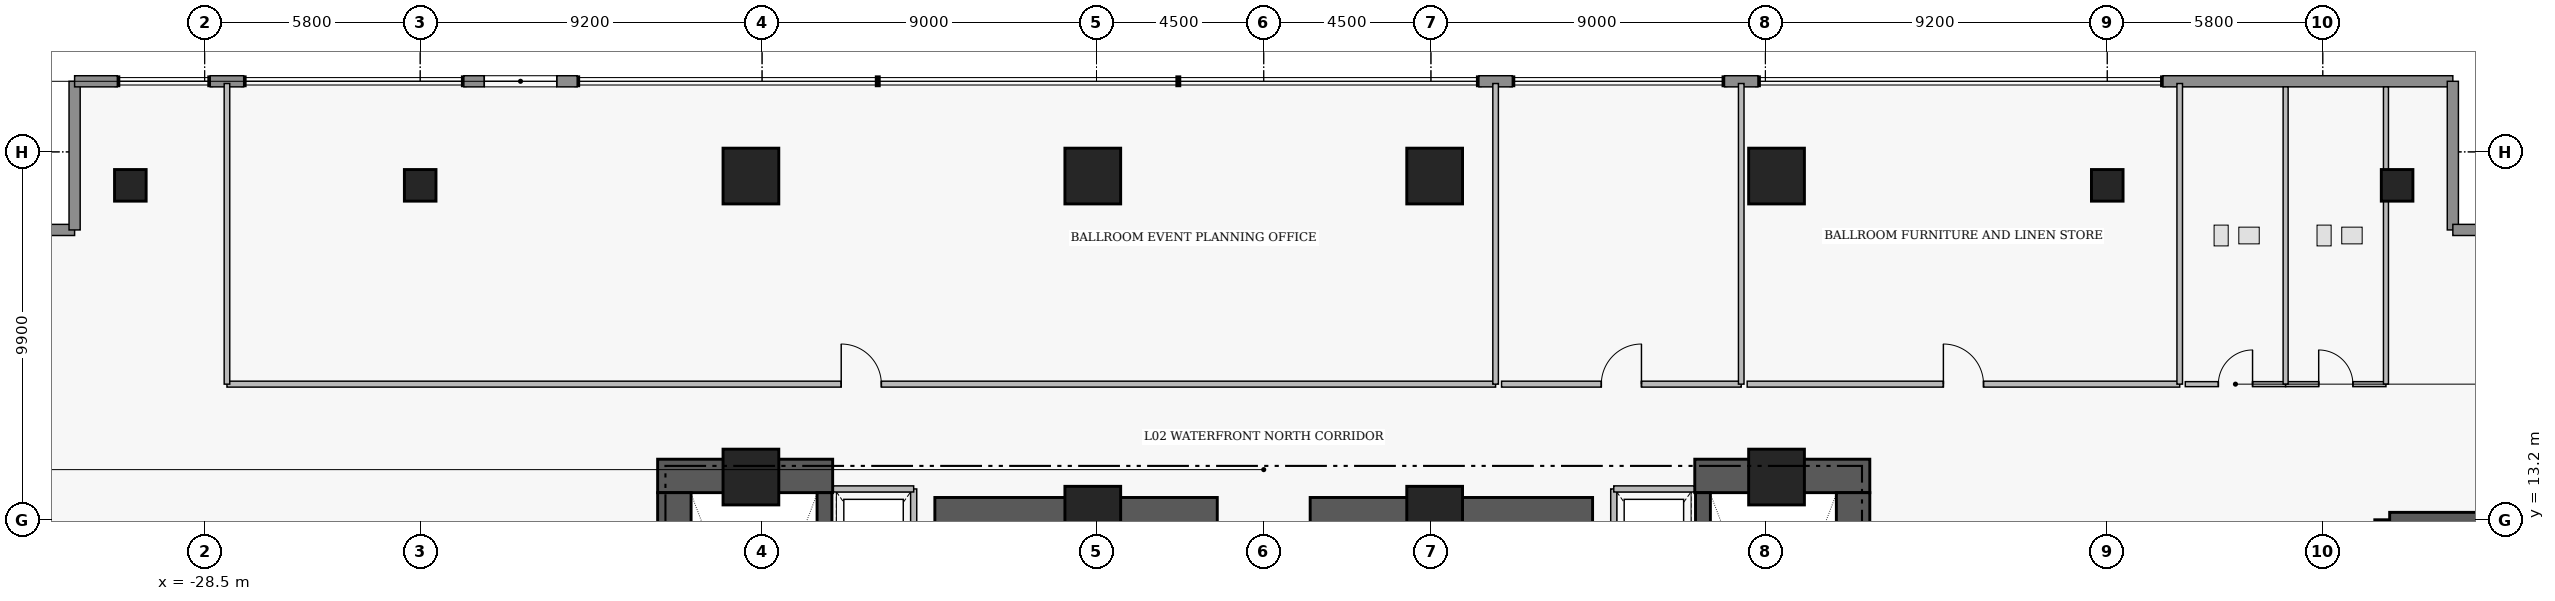
"""IFC4 building model, lengths in metres.
Left out: names, types, materials, properties, quantities, classifications, styles, units other than length and angle.
Written with IfcOpenShell. Run it as: python <this file> out.ifc"""

import sys

from ifc_helpers import new_model, si_unit, direction, frame, frame_2d, origin, origin_2d, place, context, subcontext, project, spatial, rectangle, extrude, element, fill, save


model = new_model("IFC4")
c1 = context("Model", 3, precision=1e-05, world=origin(), true_north=direction((0.0, 1.0)))
c2 = subcontext(c1, "Body", "Model", "MODEL_VIEW")
j1 = project(units=[si_unit("LENGTHUNIT", "METRE"), si_unit("PLANEANGLEUNIT", "RADIAN")], contexts=[c1])
p1 = place(None, origin())
s1 = spatial("IfcSite", under=j1, at=p1, CompositionType="ELEMENT")
p2 = place(p1, origin())
s2 = spatial("IfcBuilding", under=s1, at=p2, CompositionType="ELEMENT")
p3 = place(p2, frame((0.0, 0.0, 11.4)))
s3 = spatial("IfcBuildingStorey", under=s2, at=p3, CompositionType="ELEMENT", Elevation=11.4)
for number, where, z_axis, x_axis in (
    (1, (-16.31, 14.38, 0.0), (0.0, 0.0, 1.0), (1.0, 0.0, 0.0)),
    (2, (11.6, 14.38, 0.0), (0.0, 0.0, 1.0), (1.0, 0.0, 0.0)),
):
    element("IfcWall", number, at=place(p3, frame(where, z_axis=z_axis, x_axis=x_axis)), inside=s3, PredefinedType="SHEAR", context=c2, shape_type="SweptSolid", body=[
        extrude(rectangle(XDim=4.71, YDim=0.9, at=frame_2d((2.355, 0.0))), origin(), (0.0, 0.0, 1.0), 6.41),
    ])
for number, where, z_axis, x_axis in (
    (3, (-15.86, 4.97, 0.0), (0.0, 0.0, 1.0), (0.0, 1.0, 0.0)),
    (4, (15.86, 4.97, 0.0), (0.0, 0.0, 1.0), (0.0, 1.0, 0.0)),
):
    element("IfcWall", number, at=place(p3, frame(where, z_axis=z_axis, x_axis=x_axis)), inside=s3, PredefinedType="SHEAR", context=c2, shape_type="SweptSolid", body=[
        extrude(rectangle(XDim=8.96, YDim=0.9, at=frame_2d((4.48, 0.0))), origin(), (0.0, 0.0, 1.0), 6.41),
    ])
for number, where, z_axis, x_axis in (
    (5, (-8.85, 13.35, 0.0), (0.0, 0.0, 1.0), (1.0, 0.0, 0.0)),
    (6, (1.25, 13.35, 0.0), (0.0, 0.0, 1.0), (1.0, 0.0, 0.0)),
):
    element("IfcWall", number, at=place(p3, frame(where, z_axis=z_axis, x_axis=x_axis)), inside=s3, PredefinedType="SHEAR", context=c2, shape_type="SweptSolid", body=[
        extrude(rectangle(XDim=7.6, YDim=0.9, at=frame_2d((3.8, 0.0))), origin(), (0.0, 0.0, 1.0), 6.34),
    ])
p4 = place(p3, frame((-11.82, 4.97, 0.0), z_axis=(0.0, 0.0, 1.0), x_axis=(0.0, 1.0, 0.0)))
e7 = element("IfcWall", 7, at=p4, inside=s3, PredefinedType="SHEAR", context=c2, shape_type="SweptSolid", body=[
    extrude(rectangle(XDim=8.96, YDim=0.4, at=frame_2d((4.48, 0.0))), origin(), (0.0, 0.0, 1.0), 6.41),
])
p5 = place(p4, frame((0.31, 0.0, 0.0)))
e8 = element("IfcOpeningElement", 8, at=p5, cuts=e7, PredefinedType="OPENING", context=c2, shape_type="SweptSolid", body=[
    extrude(rectangle(XDim=1.12, YDim=2.22, at=frame_2d((0.56, 1.11))), frame((0.0, 0.21, 0.0), z_axis=(0.0, -1.0, 0.0), x_axis=(1.0, 0.0, 0.0)), (0.0, 0.0, 1.0), 0.42),
])
p6 = place(p3, frame((11.82, 13.93, 0.0), z_axis=(0.0, 0.0, 1.0), x_axis=(0.0, -1.0, 0.0)))
e9 = element("IfcWall", 9, at=p6, inside=s3, PredefinedType="SHEAR", context=c2, shape_type="SweptSolid", body=[
    extrude(rectangle(XDim=8.96, YDim=0.4, at=frame_2d((4.48, 0.0))), origin(), (0.0, 0.0, 1.0), 6.41),
])
p7 = place(p6, frame((7.53, 0.0, 0.0)))
e10 = element("IfcOpeningElement", 10, at=p7, cuts=e9, PredefinedType="OPENING", context=c2, shape_type="SweptSolid", body=[
    extrude(rectangle(XDim=1.12, YDim=2.22, at=frame_2d((0.56, 1.11))), frame((0.0, 0.21, 0.0), z_axis=(0.0, -1.0, 0.0), x_axis=(1.0, 0.0, 0.0)), (0.0, 0.0, 1.0), 0.42),
])
p8 = place(p3, frame((30.1, 13.2, 0.0), z_axis=(0.0, 0.0, 1.0), x_axis=(0.0, -1.0, 0.0)))
e11 = element("IfcWall", 11, at=p8, inside=s3, PredefinedType="SHEAR", context=c2, shape_type="SweptSolid", body=[
    extrude(rectangle(XDim=11.8, YDim=0.4, at=frame_2d((5.9, 0.0))), origin(), (0.0, 0.0, 1.0), 6.41),
])
p9 = place(p8, frame((9.7, 0.0, 0.0)))
e12 = element("IfcOpeningElement", 12, at=p9, cuts=e11, PredefinedType="OPENING", context=c2, shape_type="SweptSolid", body=[
    extrude(rectangle(XDim=1.12, YDim=2.22, at=frame_2d((0.56, 1.11))), frame((0.0, 0.21, 0.0), z_axis=(0.0, -1.0, 0.0), x_axis=(1.0, 0.0, 0.0)), (0.0, 0.0, 1.0), 0.42),
])
p10 = place(p3, frame((30.3, 13.2, 0.0), z_axis=(0.0, 0.0, 1.0), x_axis=(1.0, 0.0, 0.0)))
e13 = element("IfcWall", 13, at=p10, inside=s3, PredefinedType="SHEAR", context=c2, shape_type="SweptSolid", body=[
    extrude(rectangle(XDim=5.35, YDim=0.4, at=frame_2d((2.675, 0.0))), origin(), (0.0, 0.0, 1.0), 6.41),
])
for number, where, z_axis, x_axis in (
    (14, (-13.8, 14.35, 0.0), (0.0, 0.0, 1.0), (1.0, 0.0, 0.0)),
    (15, (-4.6, 13.35, 0.0), (0.0, 0.0, 1.0), (1.0, 0.0, 0.0)),
    (16, (4.6, 13.35, 0.0), (0.0, 0.0, 1.0), (1.0, 0.0, 0.0)),
    (17, (13.8, 14.35, 0.0), (0.0, 0.0, 1.0), (1.0, 0.0, 0.0)),
    (18, (-13.8, 22.45, 0.0), (0.0, 0.0, 1.0), (1.0, 0.0, 0.0)),
    (19, (-4.6, 22.45, 0.0), (0.0, 0.0, 1.0), (1.0, 0.0, 0.0)),
    (20, (4.6, 22.45, 0.0), (0.0, 0.0, 1.0), (1.0, 0.0, 0.0)),
    (21, (13.8, 22.45, 0.0), (0.0, 0.0, 1.0), (1.0, 0.0, 0.0)),
):
    element("IfcColumn", number, at=place(p3, frame(where, z_axis=z_axis, x_axis=x_axis)), inside=s3, PredefinedType="COLUMN", context=c2, shape_type="SweptSolid", body=[
        extrude(rectangle(XDim=1.5, YDim=1.5, at=origin_2d()), origin(), (0.0, 0.0, 1.0), 6.6),
    ])
for number, where, z_axis, x_axis in (
    (22, (-30.5, 22.2, 0.0), (0.0, 0.0, 1.0), (1.0, 0.0, 0.0)),
    (23, (30.5, 22.2, 0.0), (0.0, 0.0, 1.0), (1.0, 0.0, 0.0)),
    (24, (-22.7, 22.2, 0.0), (0.0, 0.0, 1.0), (1.0, 0.0, 0.0)),
    (25, (22.7, 22.2, 0.0), (0.0, 0.0, 1.0), (1.0, 0.0, 0.0)),
):
    element("IfcColumn", number, at=place(p3, frame(where, z_axis=z_axis, x_axis=x_axis)), inside=s3, PredefinedType="COLUMN", context=c2, shape_type="SweptSolid", body=[
        extrude(rectangle(XDim=0.85, YDim=0.85, at=origin_2d()), origin(), (0.0, 0.0, 1.0), 6.6),
    ])
for number, where, z_axis, x_axis in (
    (26, (-36.0, 21.0, 0.0), (0.0, 0.0, 1.0), (1.0, 0.0, 0.0)),
    (27, (-32.0, 21.0, 0.0), (0.0, 0.0, 1.0), (0.0, 1.0, 0.0)),
):
    element("IfcWall", number, at=place(p3, frame(where, z_axis=z_axis, x_axis=x_axis)), inside=s3, PredefinedType="STANDARD", context=c2, shape_type="SweptSolid", body=[
        extrude(rectangle(XDim=4.0, YDim=0.3, at=frame_2d((2.0, 0.0))), origin(), (0.0, 0.0, 1.0), 6.34),
    ])
p11 = place(p3, frame((-32.0, 25.0, 0.0), z_axis=(0.0, 0.0, 1.0), x_axis=(1.0, 0.0, 0.0)))
e28 = element("IfcWall", 28, at=p11, inside=s3, PredefinedType="STANDARD", context=c2, shape_type="SweptSolid", body=[
    extrude(rectangle(XDim=1.15, YDim=0.3, at=frame_2d((0.575, 0.0))), origin(), (0.0, 0.0, 1.0), 6.34),
])
p12 = place(p3, frame((-28.35, 25.0, 0.0), z_axis=(0.0, 0.0, 1.0), x_axis=(1.0, 0.0, 0.0)))
e29 = element("IfcWall", 29, at=p12, inside=s3, PredefinedType="STANDARD", context=c2, shape_type="SweptSolid", body=[
    extrude(rectangle(XDim=0.9, YDim=0.3, at=frame_2d((0.45, 0.0))), origin(), (0.0, 0.0, 1.0), 6.34),
])
p13 = place(p3, frame((-21.525, 25.0, 0.0), z_axis=(0.0, 0.0, 1.0), x_axis=(1.0, 0.0, 0.0)))
e30 = element("IfcWall", 30, at=p13, inside=s3, PredefinedType="STANDARD", context=c2, shape_type="SweptSolid", body=[
    extrude(rectangle(XDim=3.05, YDim=0.3, at=frame_2d((1.525, 0.0))), origin(), (0.0, 0.0, 1.0), 6.34),
])
p14 = place(p13, frame((0.55, 0.0, 0.9)))
e31 = element("IfcOpeningElement", 31, at=p14, cuts=e30, PredefinedType="OPENING", context=c2, shape_type="SweptSolid", body=[
    extrude(rectangle(XDim=1.95, YDim=2.05, at=frame_2d((0.975, 1.025))), frame((0.0, 0.16, 0.0), z_axis=(0.0, -1.0, 0.0), x_axis=(1.0, 0.0, 0.0)), (0.0, 0.0, 1.0), 0.32),
])
p15 = place(p3, frame((5.79, 25.0, 0.0), z_axis=(0.0, 0.0, 1.0), x_axis=(1.0, 0.0, 0.0)))
e32 = element("IfcWall", 32, at=p15, inside=s3, PredefinedType="STANDARD", context=c2, shape_type="SweptSolid", body=[
    extrude(rectangle(XDim=0.9, YDim=0.3, at=frame_2d((0.45, 0.0))), origin(), (0.0, 0.0, 1.0), 6.34),
])
p16 = place(p3, frame((12.4, 25.0, 0.0), z_axis=(0.0, 0.0, 1.0), x_axis=(1.0, 0.0, 0.0)))
e33 = element("IfcWall", 33, at=p16, inside=s3, PredefinedType="STANDARD", context=c2, shape_type="SweptSolid", body=[
    extrude(rectangle(XDim=0.9, YDim=0.3, at=frame_2d((0.45, 0.0))), origin(), (0.0, 0.0, 1.0), 6.34),
])
p17 = place(p3, frame((24.2, 25.0, 0.0), z_axis=(0.0, 0.0, 1.0), x_axis=(1.0, 0.0, 0.0)))
e34 = element("IfcWall", 34, at=p17, inside=s3, PredefinedType="STANDARD", context=c2, shape_type="SweptSolid", body=[
    extrude(rectangle(XDim=7.8, YDim=0.3, at=frame_2d((3.9, 0.0))), origin(), (0.0, 0.0, 1.0), 6.34),
])
for number, where, z_axis, x_axis in (
    (35, (32.0, 25.0, 0.0), (0.0, 0.0, 1.0), (0.0, -1.0, 0.0)),
    (36, (32.0, 21.0, 0.0), (0.0, 0.0, 1.0), (1.0, 0.0, 0.0)),
):
    element("IfcWall", number, at=place(p3, frame(where, z_axis=z_axis, x_axis=x_axis)), inside=s3, PredefinedType="STANDARD", context=c2, shape_type="SweptSolid", body=[
        extrude(rectangle(XDim=4.0, YDim=0.3, at=frame_2d((2.0, 0.0))), origin(), (0.0, 0.0, 1.0), 6.34),
    ])
p18 = place(p3, frame((-27.9, 16.85, 0.0), z_axis=(0.0, 0.0, 1.0), x_axis=(1.0, 0.0, 0.0)))
e37 = element("IfcWall", 37, at=p18, inside=s3, PredefinedType="PARTITIONING", context=c2, shape_type="SweptSolid", body=[
    extrude(rectangle(XDim=34.14, YDim=0.16, at=frame_2d((17.07, 0.0))), origin(), (0.0, 0.0, 1.0), 5.807),
])
p19 = place(p18, frame((16.53, 0.0, 0.0)))
e38 = element("IfcOpeningElement", 38, at=p19, cuts=e37, PredefinedType="OPENING", context=c2, shape_type="SweptSolid", body=[
    extrude(rectangle(XDim=1.08, YDim=2.18, at=frame_2d((0.54, 1.09))), frame((0.0, 0.09, 0.0), z_axis=(0.0, -1.0, 0.0), x_axis=(1.0, 0.0, 0.0)), (0.0, 0.0, 1.0), 0.18),
])
p20 = place(p3, frame((6.4, 16.85, 0.0), z_axis=(0.0, 0.0, 1.0), x_axis=(1.0, 0.0, 0.0)))
e39 = element("IfcWall", 39, at=p20, inside=s3, PredefinedType="PARTITIONING", context=c2, shape_type="SweptSolid", body=[
    extrude(rectangle(XDim=6.45, YDim=0.16, at=frame_2d((3.225, 0.0))), origin(), (0.0, 0.0, 1.0), 5.807),
])
p21 = place(p20, frame((2.685, 0.0, 0.0)))
e40 = element("IfcOpeningElement", 40, at=p21, cuts=e39, PredefinedType="OPENING", context=c2, shape_type="SweptSolid", body=[
    extrude(rectangle(XDim=1.08, YDim=2.18, at=frame_2d((0.54, 1.09))), frame((0.0, 0.09, 0.0), z_axis=(0.0, -1.0, 0.0), x_axis=(1.0, 0.0, 0.0)), (0.0, 0.0, 1.0), 0.18),
])
p22 = place(p3, frame((13.01, 16.85, 0.0), z_axis=(0.0, 0.0, 1.0), x_axis=(1.0, 0.0, 0.0)))
e41 = element("IfcWall", 41, at=p22, inside=s3, PredefinedType="PARTITIONING", context=c2, shape_type="SweptSolid", body=[
    extrude(rectangle(XDim=11.64, YDim=0.16, at=frame_2d((5.82, 0.0))), origin(), (0.0, 0.0, 1.0), 5.807),
])
p23 = place(p22, frame((5.28, 0.0, 0.0)))
e42 = element("IfcOpeningElement", 42, at=p23, cuts=e41, PredefinedType="OPENING", context=c2, shape_type="SweptSolid", body=[
    extrude(rectangle(XDim=1.08, YDim=2.18, at=frame_2d((0.54, 1.09))), frame((0.0, 0.09, 0.0), z_axis=(0.0, -1.0, 0.0), x_axis=(1.0, 0.0, 0.0)), (0.0, 0.0, 1.0), 0.18),
])
p24 = place(p3, frame((24.8, 16.85, 0.0), z_axis=(0.0, 0.0, 1.0), x_axis=(1.0, 0.0, 0.0)))
e43 = element("IfcWall", 43, at=p24, inside=s3, PredefinedType="PLUMBINGWALL", context=c2, shape_type="SweptSolid", body=[
    extrude(rectangle(XDim=2.7, YDim=0.135, at=frame_2d((1.35, 0.0))), origin(), (0.0, 0.0, 1.0), 6.34),
])
p25 = place(p24, frame((0.89, 0.0, 0.0)))
e44 = element("IfcOpeningElement", 44, at=p25, cuts=e43, PredefinedType="OPENING", context=c2, shape_type="SweptSolid", body=[
    extrude(rectangle(XDim=0.92, YDim=2.12, at=frame_2d((0.46, 1.06))), frame((0.0, 0.077, 0.0), z_axis=(0.0, -1.0, 0.0), x_axis=(1.0, 0.0, 0.0)), (0.0, 0.0, 1.0), 0.155),
])
p26 = place(p3, frame((27.5, 16.85, 0.0), z_axis=(0.0, 0.0, 1.0), x_axis=(1.0, 0.0, 0.0)))
e45 = element("IfcWall", 45, at=p26, inside=s3, PredefinedType="PLUMBINGWALL", context=c2, shape_type="SweptSolid", body=[
    extrude(rectangle(XDim=2.7, YDim=0.135, at=frame_2d((1.35, 0.0))), origin(), (0.0, 0.0, 1.0), 6.34),
])
p27 = place(p26, frame((0.89, 0.0, 0.0)))
e46 = element("IfcOpeningElement", 46, at=p27, cuts=e45, PredefinedType="OPENING", context=c2, shape_type="SweptSolid", body=[
    extrude(rectangle(XDim=0.92, YDim=2.12, at=frame_2d((0.46, 1.06))), frame((0.0, 0.077, 0.0), z_axis=(0.0, -1.0, 0.0), x_axis=(1.0, 0.0, 0.0)), (0.0, 0.0, 1.0), 0.155),
])
p28 = place(p3, frame((-9.42, 11.07, 0.0), z_axis=(0.0, 0.0, 1.0), x_axis=(0.0, 1.0, 0.0)))
e47 = element("IfcWall", 47, at=p28, inside=s3, PredefinedType="PARTITIONING", context=c2, shape_type="SweptSolid", body=[
    extrude(rectangle(XDim=2.96, YDim=0.165, at=frame_2d((1.48, 0.0))), origin(), (0.0, 0.0, 1.0), 6.34),
])
p29 = place(p3, frame((-11.58, 14.03, 0.0), z_axis=(0.0, 0.0, 1.0), x_axis=(1.0, 0.0, 0.0)))
e48 = element("IfcWall", 48, at=p29, inside=s3, PredefinedType="PARTITIONING", context=c2, shape_type="SweptSolid", body=[
    extrude(rectangle(XDim=2.16, YDim=0.165, at=frame_2d((1.08, 0.0))), origin(), (0.0, 0.0, 1.0), 6.34),
])
p30 = place(p3, frame((9.42, 11.07, 0.0), z_axis=(0.0, 0.0, 1.0), x_axis=(0.0, 1.0, 0.0)))
e49 = element("IfcWall", 49, at=p30, inside=s3, PredefinedType="PARTITIONING", context=c2, shape_type="SweptSolid", body=[
    extrude(rectangle(XDim=2.96, YDim=0.165, at=frame_2d((1.48, 0.0))), origin(), (0.0, 0.0, 1.0), 6.34),
])
p31 = place(p3, frame((9.42, 14.03, 0.0), z_axis=(0.0, 0.0, 1.0), x_axis=(1.0, 0.0, 0.0)))
e50 = element("IfcWall", 50, at=p31, inside=s3, PredefinedType="PARTITIONING", context=c2, shape_type="SweptSolid", body=[
    extrude(rectangle(XDim=2.16, YDim=0.165, at=frame_2d((1.08, 0.0))), origin(), (0.0, 0.0, 1.0), 6.34),
])
for number, where, z_axis, x_axis in (
    (51, (-27.9, 16.85, 0.0), (0.0, 0.0, 1.0), (0.0, 1.0, 0.0)),
    (52, (6.24, 16.85, 0.0), (0.0, 0.0, 1.0), (0.0, 1.0, 0.0)),
    (53, (12.85, 16.85, 0.0), (0.0, 0.0, 1.0), (0.0, 1.0, 0.0)),
    (54, (24.65, 16.85, 0.0), (0.0, 0.0, 1.0), (0.0, 1.0, 0.0)),
):
    element("IfcWall", number, at=place(p3, frame(where, z_axis=z_axis, x_axis=x_axis)), inside=s3, PredefinedType="PARTITIONING", context=c2, shape_type="SweptSolid", body=[
        extrude(rectangle(XDim=8.09, YDim=0.15, at=frame_2d((4.045, 0.0))), origin(), (0.0, 0.0, 1.0), 6.34),
    ])
for number, where, z_axis, x_axis in (
    (55, (30.2, 16.85, 0.0), (0.0, 0.0, 1.0), (0.0, 1.0, 0.0)),
    (56, (27.5, 16.85, 0.0), (0.0, 0.0, 1.0), (0.0, 1.0, 0.0)),
):
    element("IfcWall", number, at=place(p3, frame(where, z_axis=z_axis, x_axis=x_axis)), inside=s3, PredefinedType="PLUMBINGWALL", context=c2, shape_type="SweptSolid", body=[
        extrude(rectangle(XDim=8.0, YDim=0.135, at=frame_2d((4.0, 0.0))), origin(), (0.0, 0.0, 1.0), 6.34),
    ])
p32 = place(p14, origin())
e57 = element("IfcWindow", 57, at=p32, inside=s3, PartitioningType="SINGLE_PANEL", PredefinedType="WINDOW", context=c2, shape_type="SweptSolid", body=[
    extrude(rectangle(XDim=1.95, YDim=2.05, at=frame_2d((0.975, 1.025))), frame((0.0, 0.03, 0.0), z_axis=(0.0, -1.0, 0.0), x_axis=(1.0, 0.0, 0.0)), (0.0, 0.0, 1.0), 0.06),
])
fill(e31, e57)
p33 = place(p19, origin())
e58 = element("IfcDoor", 58, at=p33, inside=s3, OperationType="SINGLE_SWING_LEFT", PredefinedType="DOOR", context=c2, shape_type="SweptSolid", body=[
    extrude(rectangle(XDim=1.08, YDim=2.18, at=frame_2d((0.54, 1.09))), frame((0.0, 0.025, 0.0), z_axis=(0.0, -1.0, 0.0), x_axis=(1.0, 0.0, 0.0)), (0.0, 0.0, 1.0), 0.05),
])
fill(e38, e58)
p34 = place(p21, origin())
e59 = element("IfcDoor", 59, at=p34, inside=s3, OperationType="SINGLE_SWING_RIGHT", PredefinedType="DOOR", context=c2, shape_type="SweptSolid", body=[
    extrude(rectangle(XDim=1.08, YDim=2.18, at=frame_2d((0.54, 1.09))), frame((0.0, 0.025, 0.0), z_axis=(0.0, -1.0, 0.0), x_axis=(1.0, 0.0, 0.0)), (0.0, 0.0, 1.0), 0.05),
])
fill(e40, e59)
p35 = place(p23, origin())
e60 = element("IfcDoor", 60, at=p35, inside=s3, OperationType="SINGLE_SWING_LEFT", PredefinedType="DOOR", context=c2, shape_type="SweptSolid", body=[
    extrude(rectangle(XDim=1.08, YDim=2.18, at=frame_2d((0.54, 1.09))), frame((0.0, 0.025, 0.0), z_axis=(0.0, -1.0, 0.0), x_axis=(1.0, 0.0, 0.0)), (0.0, 0.0, 1.0), 0.05),
])
fill(e42, e60)
p36 = place(p25, origin())
e61 = element("IfcDoor", 61, at=p36, inside=s3, OperationType="SINGLE_SWING_RIGHT", PredefinedType="DOOR", context=c2, shape_type="SweptSolid", body=[
    extrude(rectangle(XDim=0.92, YDim=2.12, at=frame_2d((0.46, 1.06))), frame((0.0, 0.025, 0.0), z_axis=(0.0, -1.0, 0.0), x_axis=(1.0, 0.0, 0.0)), (0.0, 0.0, 1.0), 0.05),
])
fill(e44, e61)
p37 = place(p27, origin())
e62 = element("IfcDoor", 62, at=p37, inside=s3, OperationType="SINGLE_SWING_LEFT", PredefinedType="DOOR", context=c2, shape_type="SweptSolid", body=[
    extrude(rectangle(XDim=0.92, YDim=2.12, at=frame_2d((0.46, 1.06))), frame((0.0, 0.025, 0.0), z_axis=(0.0, -1.0, 0.0), x_axis=(1.0, 0.0, 0.0)), (0.0, 0.0, 1.0), 0.05),
])
fill(e46, e62)
save(model, sys.argv[1])
